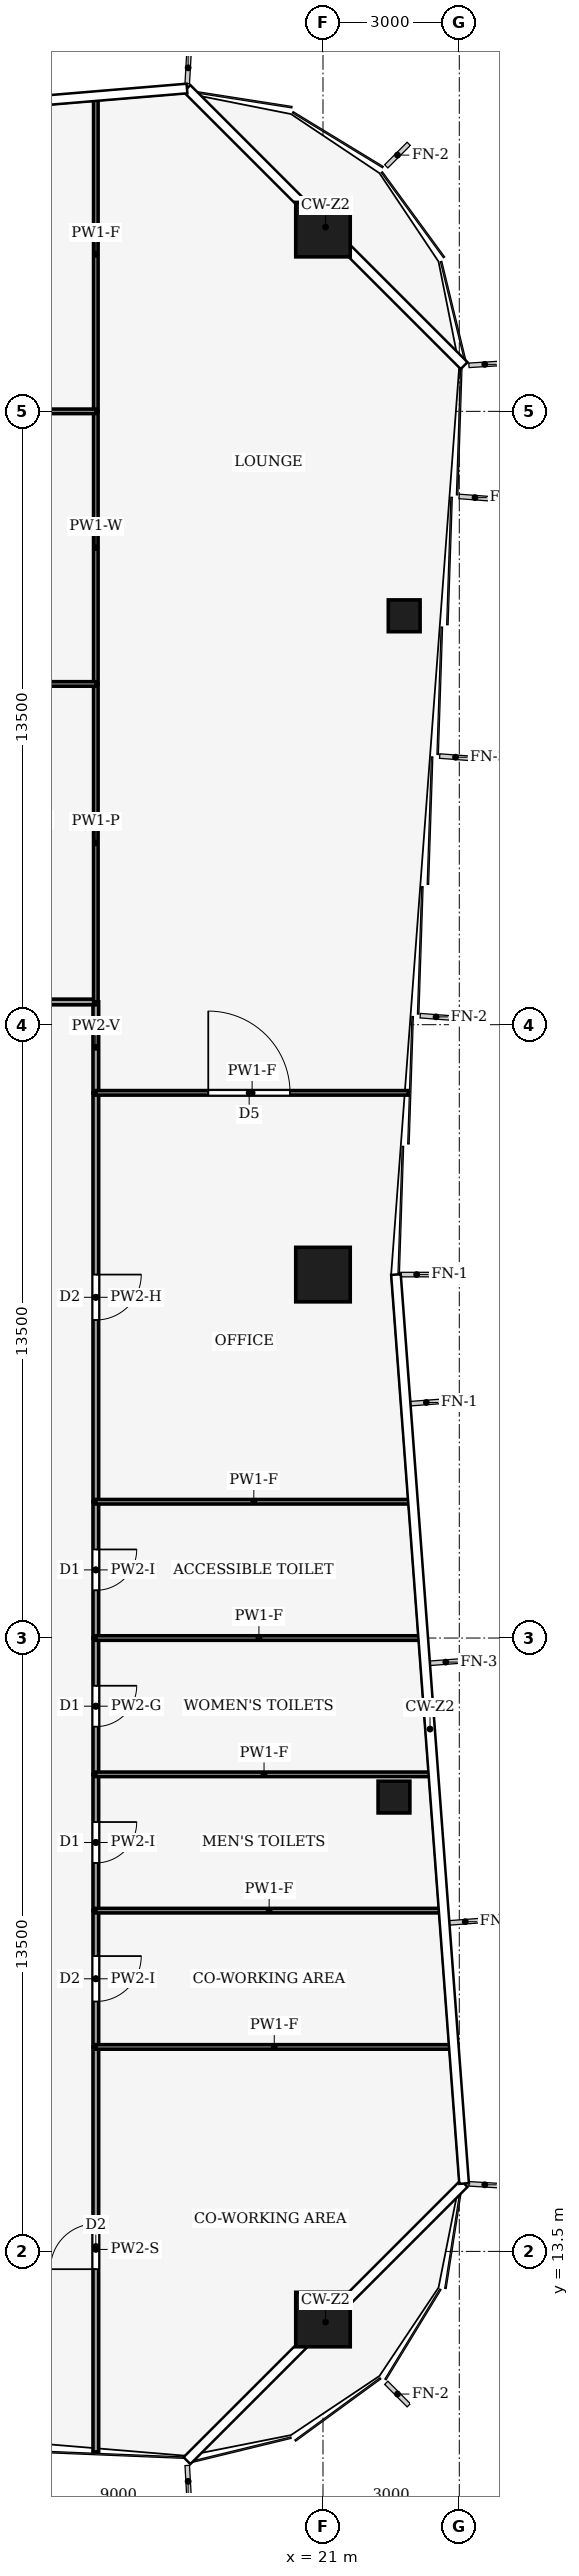
"""IFC4 building model, lengths in metres.
Left out: names, types, materials, properties, quantities, classifications, styles, units other than length and angle.
Written with IfcOpenShell. Run it as: python <this file> out.ifc"""

import sys

from ifc_helpers import new_model, si_unit, direction, frame, frame_2d, origin, origin_2d, place, context, subcontext, project, spatial, rectangle, hollow_rectangle, extrude, element, fill, save


model = new_model("IFC4")
c1 = context("Model", 3, precision=1e-05, world=origin(), true_north=direction((0.0, 1.0)))
c2 = subcontext(c1, "Body", "Model", "MODEL_VIEW")
j1 = project(units=[si_unit("LENGTHUNIT", "METRE"), si_unit("PLANEANGLEUNIT", "RADIAN")], contexts=[c1])
p1 = place(None, origin())
s1 = spatial("IfcSite", under=j1, at=p1, CompositionType="ELEMENT")
p2 = place(p1, origin())
s2 = spatial("IfcBuilding", under=s1, at=p2, CompositionType="ELEMENT")
p3 = place(p2, frame((0.0, 0.0, 150.0)))
s3 = spatial("IfcBuildingStorey", under=s2, at=p3, CompositionType="ELEMENT", Elevation=150.0)
for number, where, z_axis, x_axis in (
    (1, (21.0, 58.0, 0.0), (0.0, 0.0, 1.0), (1.0, 0.0, 0.0)),
    (2, (21.0, 35.0, 0.0), (0.0, 0.0, 1.0), (1.0, 0.0, 0.0)),
    (3, (21.0, 12.0, 0.0), (0.0, 0.0, 1.0), (1.0, 0.0, 0.0)),
):
    element("IfcColumn", number, at=place(p3, frame(where, z_axis=z_axis, x_axis=x_axis)), inside=s3, PredefinedType="COLUMN", context=c2, shape_type="SweptSolid", body=[
        extrude(hollow_rectangle(XDim=1.2, YDim=1.2, WallThickness=0.07, at=origin_2d()), origin(), (0.0, 0.0, 1.0), 4.0),
    ])
for number, where, z_axis, x_axis in (
    (4, (22.562, 23.5, 0.0), (0.0, 0.0, 1.0), (1.0, 0.0, 0.0)),
    (5, (22.788, 49.5, 0.0), (0.0, 0.0, 1.0), (1.0, 0.0, 0.0)),
):
    element("IfcColumn", number, at=place(p3, frame(where, z_axis=z_axis, x_axis=x_axis)), inside=s3, PredefinedType="COLUMN", context=c2, shape_type="SweptSolid", body=[
        extrude(hollow_rectangle(XDim=0.7, YDim=0.7, WallThickness=0.03, at=origin_2d()), origin(), (0.0, 0.0, 1.0), 4.0),
    ])
p4 = place(p3, frame((16.0, 9.087, 0.0), z_axis=(0.0, 0.0, 1.0), x_axis=(0.0, 1.0, 0.0)))
e6 = element("IfcWall", 6, at=p4, inside=s3, PredefinedType="PARTITIONING", context=c2, shape_type="SweptSolid", body=[
    extrude(rectangle(XDim=8.913, YDim=0.125, at=frame_2d((4.457, 0.0))), origin(), (0.0, 0.0, 1.0), 3.04),
])
p5 = place(p4, frame((4.022, 0.0, 0.0)))
e7 = element("IfcOpeningElement", 7, at=p5, cuts=e6, PredefinedType="OPENING", context=c2, shape_type="SweptSolid", body=[
    extrude(rectangle(XDim=1.0, YDim=2.1, at=frame_2d((0.5, 1.05))), frame((0.0, 0.073, 0.0), z_axis=(0.0, -1.0, 0.0), x_axis=(1.0, 0.0, 0.0)), (0.0, 0.0, 1.0), 0.145),
])
p6 = place(p3, frame((16.0, 21.0, 0.0), z_axis=(0.0, 0.0, 1.0), x_axis=(0.0, -1.0, 0.0)))
e8 = element("IfcWall", 8, at=p6, inside=s3, PredefinedType="PARTITIONING", context=c2, shape_type="SweptSolid", body=[
    extrude(rectangle(XDim=3.0, YDim=0.125, at=frame_2d((1.5, 0.0))), origin(), (0.0, 0.0, 1.0), 3.48),
])
p7 = place(p6, frame((1.0, 0.0, 0.0)))
e9 = element("IfcOpeningElement", 9, at=p7, cuts=e8, PredefinedType="OPENING", context=c2, shape_type="SweptSolid", body=[
    extrude(rectangle(XDim=1.0, YDim=2.1, at=frame_2d((0.5, 1.05))), frame((0.0, 0.073, 0.0), z_axis=(0.0, -1.0, 0.0), x_axis=(1.0, 0.0, 0.0)), (0.0, 0.0, 1.0), 0.145),
])
p8 = place(p3, frame((16.0, 24.0, 0.0), z_axis=(0.0, 0.0, 1.0), x_axis=(0.0, -1.0, 0.0)))
e10 = element("IfcWall", 10, at=p8, inside=s3, PredefinedType="PARTITIONING", context=c2, shape_type="SweptSolid", body=[
    extrude(rectangle(XDim=3.0, YDim=0.125, at=frame_2d((1.5, 0.0))), origin(), (0.0, 0.0, 1.0), 3.48),
])
p9 = place(p8, frame((1.05, 0.0, 0.0)))
e11 = element("IfcOpeningElement", 11, at=p9, cuts=e10, PredefinedType="OPENING", context=c2, shape_type="SweptSolid", body=[
    extrude(rectangle(XDim=0.9, YDim=2.1, at=frame_2d((0.45, 1.05))), frame((0.0, 0.073, 0.0), z_axis=(0.0, -1.0, 0.0), x_axis=(1.0, 0.0, 0.0)), (0.0, 0.0, 1.0), 0.145),
])
p10 = place(p3, frame((16.0, 27.0, 0.0), z_axis=(0.0, 0.0, 1.0), x_axis=(0.0, -1.0, 0.0)))
e12 = element("IfcWall", 12, at=p10, inside=s3, PredefinedType="PARTITIONING", context=c2, shape_type="SweptSolid", body=[
    extrude(rectangle(XDim=3.0, YDim=0.125, at=frame_2d((1.5, 0.0))), origin(), (0.0, 0.0, 1.0), 3.87),
])
p11 = place(p10, frame((1.05, 0.0, 0.0)))
e13 = element("IfcOpeningElement", 13, at=p11, cuts=e12, PredefinedType="OPENING", context=c2, shape_type="SweptSolid", body=[
    extrude(rectangle(XDim=0.9, YDim=2.1, at=frame_2d((0.45, 1.05))), frame((0.0, 0.073, 0.0), z_axis=(0.0, -1.0, 0.0), x_axis=(1.0, 0.0, 0.0)), (0.0, 0.0, 1.0), 0.145),
])
p12 = place(p3, frame((16.0, 30.0, 0.0), z_axis=(0.0, 0.0, 1.0), x_axis=(0.0, -1.0, 0.0)))
e14 = element("IfcWall", 14, at=p12, inside=s3, PredefinedType="PARTITIONING", context=c2, shape_type="SweptSolid", body=[
    extrude(rectangle(XDim=3.0, YDim=0.125, at=frame_2d((1.5, 0.0))), origin(), (0.0, 0.0, 1.0), 3.48),
])
p13 = place(p12, frame((1.05, 0.0, 0.0)))
e15 = element("IfcOpeningElement", 15, at=p13, cuts=e14, PredefinedType="OPENING", context=c2, shape_type="SweptSolid", body=[
    extrude(rectangle(XDim=0.9, YDim=2.1, at=frame_2d((0.45, 1.05))), frame((0.0, 0.073, 0.0), z_axis=(0.0, -1.0, 0.0), x_axis=(1.0, 0.0, 0.0)), (0.0, 0.0, 1.0), 0.145),
])
p14 = place(p3, frame((16.0, 39.0, 0.0), z_axis=(0.0, 0.0, 1.0), x_axis=(0.0, -1.0, 0.0)))
e16 = element("IfcWall", 16, at=p14, inside=s3, PredefinedType="PARTITIONING", context=c2, shape_type="SweptSolid", body=[
    extrude(rectangle(XDim=9.0, YDim=0.125, at=frame_2d((4.5, 0.0))), origin(), (0.0, 0.0, 1.0), 3.14),
])
p15 = place(p14, frame((4.0, 0.0, 0.0)))
e17 = element("IfcOpeningElement", 17, at=p15, cuts=e16, PredefinedType="OPENING", context=c2, shape_type="SweptSolid", body=[
    extrude(rectangle(XDim=1.0, YDim=2.1, at=frame_2d((0.5, 1.05))), frame((0.0, 0.073, 0.0), z_axis=(0.0, -1.0, 0.0), x_axis=(1.0, 0.0, 0.0)), (0.0, 0.0, 1.0), 0.145),
])
p16 = place(p3, frame((16.0, 39.0, 0.0), z_axis=(0.0, 0.0, 1.0), x_axis=(0.0, 1.0, 0.0)))
e18 = element("IfcWall", 18, at=p16, inside=s3, PredefinedType="PARTITIONING", context=c2, shape_type="SweptSolid", body=[
    extrude(rectangle(XDim=2.004, YDim=0.125, at=frame_2d((1.002, 0.0))), origin(), (0.0, 0.0, 1.0), 3.44),
])
p17 = place(p3, frame((16.0, 41.0, 0.0), z_axis=(0.0, 0.0, 1.0), x_axis=(-1.0, 0.0, 0.0)))
e19 = element("IfcWall", 19, at=p17, inside=s3, PredefinedType="PARTITIONING", context=c2, shape_type="SweptSolid", body=[
    extrude(rectangle(XDim=4.0, YDim=0.125, at=frame_2d((2.0, 0.0))), origin(), (0.0, 0.0, 1.0), 3.44),
])
p18 = place(p3, frame((23.855, 18.0, 0.0), z_axis=(0.0, 0.0, 1.0), x_axis=(-1.0, 0.0, 0.0)))
e20 = element("IfcWall", 20, at=p18, inside=s3, PredefinedType="PARTITIONING", context=c2, shape_type="SweptSolid", body=[
    extrude(rectangle(XDim=7.855, YDim=0.1, at=frame_2d((3.927, 0.0))), origin(), (0.0, 0.0, 1.0), 3.04),
])
p19 = place(p3, frame((23.63, 21.0, 0.0), z_axis=(0.0, 0.0, 1.0), x_axis=(-1.0, 0.0, 0.0)))
e21 = element("IfcWall", 21, at=p19, inside=s3, PredefinedType="PARTITIONING", context=c2, shape_type="SweptSolid", body=[
    extrude(rectangle(XDim=7.63, YDim=0.1, at=frame_2d((3.815, 0.0))), origin(), (0.0, 0.0, 1.0), 3.04),
])
p20 = place(p3, frame((23.405, 24.0, 0.0), z_axis=(0.0, 0.0, 1.0), x_axis=(-1.0, 0.0, 0.0)))
e22 = element("IfcWall", 22, at=p20, inside=s3, PredefinedType="PARTITIONING", context=c2, shape_type="SweptSolid", body=[
    extrude(rectangle(XDim=7.405, YDim=0.1, at=frame_2d((3.703, 0.0))), origin(), (0.0, 0.0, 1.0), 3.04),
])
p21 = place(p3, frame((23.18, 27.0, 0.0), z_axis=(0.0, 0.0, 1.0), x_axis=(-1.0, 0.0, 0.0)))
e23 = element("IfcWall", 23, at=p21, inside=s3, PredefinedType="PARTITIONING", context=c2, shape_type="SweptSolid", body=[
    extrude(rectangle(XDim=7.18, YDim=0.1, at=frame_2d((3.59, 0.0))), origin(), (0.0, 0.0, 1.0), 3.04),
])
p22 = place(p3, frame((22.955, 30.0, 0.0), z_axis=(0.0, 0.0, 1.0), x_axis=(-1.0, 0.0, 0.0)))
e24 = element("IfcWall", 24, at=p22, inside=s3, PredefinedType="PARTITIONING", context=c2, shape_type="SweptSolid", body=[
    extrude(rectangle(XDim=6.955, YDim=0.1, at=frame_2d((3.478, 0.0))), origin(), (0.0, 0.0, 1.0), 3.04),
])
p23 = place(p3, frame((16.0, 39.0, 0.0), z_axis=(0.0, 0.0, 1.0), x_axis=(1.0, 0.0, 0.0)))
e25 = element("IfcWall", 25, at=p23, inside=s3, PredefinedType="PARTITIONING", context=c2, shape_type="SweptSolid", body=[
    extrude(rectangle(XDim=6.88, YDim=0.1, at=frame_2d((3.44, 0.0))), origin(), (0.0, 0.0, 1.0), 3.04),
])
p24 = place(p23, frame((2.475, 0.0, 0.0)))
e26 = element("IfcOpeningElement", 26, at=p24, cuts=e25, PredefinedType="OPENING", context=c2, shape_type="SweptSolid", body=[
    extrude(rectangle(XDim=1.8, YDim=2.1, at=frame_2d((0.9, 1.05))), frame((0.0, 0.06, 0.0), z_axis=(0.0, -1.0, 0.0), x_axis=(1.0, 0.0, 0.0)), (0.0, 0.0, 1.0), 0.12),
])
p25 = place(p3, frame((16.0, 48.0, 0.0), z_axis=(0.0, 0.0, 1.0), x_axis=(0.0, -1.0, 0.0)))
e27 = element("IfcWall", 27, at=p25, inside=s3, PredefinedType="PARTITIONING", context=c2, shape_type="SweptSolid", body=[
    extrude(rectangle(XDim=7.0, YDim=0.1, at=frame_2d((3.5, 0.0))), origin(), (0.0, 0.0, 1.0), 3.44),
])
p26 = place(p3, frame((16.0, 54.0, 0.0), z_axis=(0.0, 0.0, 1.0), x_axis=(0.0, -1.0, 0.0)))
e28 = element("IfcWall", 28, at=p26, inside=s3, PredefinedType="PARTITIONING", context=c2, shape_type="SweptSolid", body=[
    extrude(rectangle(XDim=6.0, YDim=0.1, at=frame_2d((3.0, 0.0))), origin(), (0.0, 0.0, 1.0), 3.24),
])
p27 = place(p3, frame((16.0, 60.913, 0.0), z_axis=(0.0, 0.0, 1.0), x_axis=(0.0, -1.0, 0.0)))
e29 = element("IfcWall", 29, at=p27, inside=s3, PredefinedType="PARTITIONING", context=c2, shape_type="SweptSolid", body=[
    extrude(rectangle(XDim=6.913, YDim=0.1, at=frame_2d((3.457, 0.0))), origin(), (0.0, 0.0, 1.0), 3.04),
])
p28 = place(p3, frame((16.0, 48.0, 0.0), z_axis=(0.0, 0.0, 1.0), x_axis=(-1.0, 0.0, 0.0)))
e30 = element("IfcWall", 30, at=p28, inside=s3, PredefinedType="PARTITIONING", context=c2, shape_type="SweptSolid", body=[
    extrude(rectangle(XDim=4.004, YDim=0.1, at=frame_2d((2.002, 0.0))), origin(), (0.0, 0.0, 1.0), 3.87),
])
p29 = place(p3, frame((6.0, 54.0, 0.0), z_axis=(0.0, 0.0, 1.0), x_axis=(1.0, 0.0, 0.0)))
e31 = element("IfcWall", 31, at=p29, inside=s3, PredefinedType="PARTITIONING", context=c2, shape_type="SweptSolid", body=[
    extrude(rectangle(XDim=10.0, YDim=0.1, at=frame_2d((5.0, 0.0))), origin(), (0.0, 0.0, 1.0), 3.44),
])
p30 = place(p29, frame((4.5, 0.0, 0.0)))
e32 = element("IfcOpeningElement", 32, at=p30, cuts=e31, PredefinedType="OPENING", context=c2, shape_type="SweptSolid", body=[
    extrude(rectangle(XDim=1.0, YDim=2.1, at=frame_2d((0.5, 1.05))), frame((0.0, 0.06, 0.0), z_axis=(0.0, -1.0, 0.0), x_axis=(1.0, 0.0, 0.0)), (0.0, 0.0, 1.0), 0.12),
])
p31 = place(p5, origin())
e33 = element("IfcDoor", 33, at=p31, inside=s3, OperationType="SINGLE_SWING_RIGHT", PredefinedType="DOOR", context=c2, shape_type="SweptSolid", body=[
    extrude(rectangle(XDim=1.0, YDim=2.1, at=frame_2d((0.5, 1.05))), frame((0.0, 0.025, 0.0), z_axis=(0.0, -1.0, 0.0), x_axis=(1.0, 0.0, 0.0)), (0.0, 0.0, 1.0), 0.05),
])
fill(e7, e33)
p32 = place(p7, origin())
e34 = element("IfcDoor", 34, at=p32, inside=s3, OperationType="SINGLE_SWING_RIGHT", PredefinedType="DOOR", context=c2, shape_type="SweptSolid", body=[
    extrude(rectangle(XDim=1.0, YDim=2.1, at=frame_2d((0.5, 1.05))), frame((0.0, 0.025, 0.0), z_axis=(0.0, -1.0, 0.0), x_axis=(1.0, 0.0, 0.0)), (0.0, 0.0, 1.0), 0.05),
])
fill(e9, e34)
p33 = place(p9, origin())
e35 = element("IfcDoor", 35, at=p33, inside=s3, OperationType="SINGLE_SWING_LEFT", PredefinedType="DOOR", context=c2, shape_type="SweptSolid", body=[
    extrude(rectangle(XDim=0.9, YDim=2.1, at=frame_2d((0.45, 1.05))), frame((0.0, 0.025, 0.0), z_axis=(0.0, -1.0, 0.0), x_axis=(1.0, 0.0, 0.0)), (0.0, 0.0, 1.0), 0.05),
])
fill(e11, e35)
p34 = place(p11, origin())
e36 = element("IfcDoor", 36, at=p34, inside=s3, OperationType="SINGLE_SWING_RIGHT", PredefinedType="DOOR", context=c2, shape_type="SweptSolid", body=[
    extrude(rectangle(XDim=0.9, YDim=2.1, at=frame_2d((0.45, 1.05))), frame((0.0, 0.025, 0.0), z_axis=(0.0, -1.0, 0.0), x_axis=(1.0, 0.0, 0.0)), (0.0, 0.0, 1.0), 0.05),
])
fill(e13, e36)
p35 = place(p13, origin())
e37 = element("IfcDoor", 37, at=p35, inside=s3, OperationType="SINGLE_SWING_LEFT", PredefinedType="DOOR", context=c2, shape_type="SweptSolid", body=[
    extrude(rectangle(XDim=0.9, YDim=2.1, at=frame_2d((0.45, 1.05))), frame((0.0, 0.025, 0.0), z_axis=(0.0, -1.0, 0.0), x_axis=(1.0, 0.0, 0.0)), (0.0, 0.0, 1.0), 0.05),
])
fill(e15, e37)
p36 = place(p15, origin())
e38 = element("IfcDoor", 38, at=p36, inside=s3, OperationType="SINGLE_SWING_RIGHT", PredefinedType="DOOR", context=c2, shape_type="SweptSolid", body=[
    extrude(rectangle(XDim=1.0, YDim=2.1, at=frame_2d((0.5, 1.05))), frame((0.0, 0.025, 0.0), z_axis=(0.0, -1.0, 0.0), x_axis=(1.0, 0.0, 0.0)), (0.0, 0.0, 1.0), 0.05),
])
fill(e17, e38)
p37 = place(p24, origin())
e39 = element("IfcDoor", 39, at=p37, inside=s3, OperationType="DOUBLE_DOOR_SINGLE_SWING", PredefinedType="DOOR", context=c2, shape_type="SweptSolid", body=[
    extrude(rectangle(XDim=1.8, YDim=2.1, at=frame_2d((0.9, 1.05))), frame((0.0, 0.025, 0.0), z_axis=(0.0, -1.0, 0.0), x_axis=(1.0, 0.0, 0.0)), (0.0, 0.0, 1.0), 0.05),
])
fill(e26, e39)
save(model, sys.argv[1])
